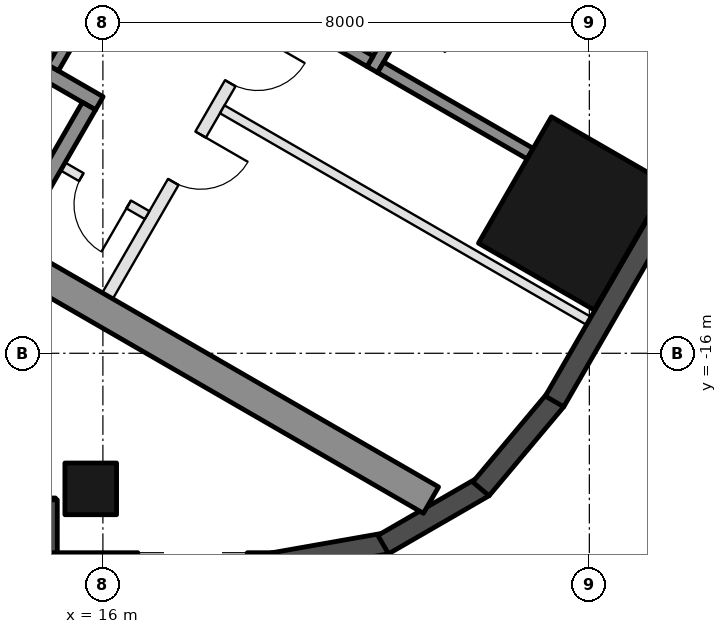
"""IFC4 building model, lengths in metres.
Left out: names, types, materials, properties, quantities, classifications, styles, units other than length and angle.
Written with IfcOpenShell. Run it as: python <this file> out.ifc"""

import sys

from ifc_helpers import new_model, si_unit, direction, frame, frame_2d, origin, origin_2d, place, context, subcontext, project, spatial, rectangle, hollow_rectangle, extrude, element, fill, save


model = new_model("IFC4")
c1 = context("Model", 3, precision=1e-05, world=origin(), true_north=direction((0.0, 1.0)))
c2 = subcontext(c1, "Body", "Model", "MODEL_VIEW")
j1 = project(units=[si_unit("LENGTHUNIT", "METRE"), si_unit("PLANEANGLEUNIT", "RADIAN")], contexts=[c1])
p1 = place(None, origin())
s1 = spatial("IfcSite", under=j1, at=p1, CompositionType="ELEMENT")
p2 = place(p1, origin())
s2 = spatial("IfcBuilding", under=s1, at=p2, CompositionType="ELEMENT")
p3 = place(p2, frame((0.0, 0.0, 165.1)))
s3 = spatial("IfcBuildingStorey", under=s2, at=p3, CompositionType="ELEMENT", Elevation=165.1)
p4 = place(p3, frame((15.8, -18.23, 0.0), z_axis=(0.0, 0.0, 1.0), x_axis=(-1.0, 0.0, 0.0)))
e1 = element("IfcColumn", 1, at=p4, inside=s3, PredefinedType="COLUMN", context=c2, shape_type="SweptSolid", body=[
    extrude(hollow_rectangle(XDim=0.85, YDim=0.85, WallThickness=0.04, at=origin_2d()), origin(), (0.0, 0.0, 1.0), 3.7),
])
p5 = place(p3, frame((23.729, -13.7, 0.0), z_axis=(0.0, 0.0, 1.0), x_axis=(0.5, 0.866025403784, 0.0)))
e2 = element("IfcColumn", 2, at=p5, inside=s3, PredefinedType="COLUMN", context=c2, shape_type="SweptSolid", body=[
    extrude(hollow_rectangle(XDim=2.4, YDim=2.2, WallThickness=0.06, at=origin_2d()), origin(), (0.0, 0.0, 1.0), 3.7),
])
p6 = place(p3, frame((8.48, -18.555, 0.0), z_axis=(0.0, 0.0, 1.0), x_axis=(1.0, 0.0, 0.0)))
e3 = element("IfcWall", 3, at=p6, inside=s3, PredefinedType="SOLIDWALL", context=c2, shape_type="SweptSolid", body=[
    extrude(rectangle(XDim=6.74, YDim=0.35, at=frame_2d((3.37, 0.0))), origin(), (0.0, 0.0, 1.0), 3.55),
])
p7 = place(p6, frame((0.32, 0.0, 0.0)))
e4 = element("IfcOpeningElement", 4, at=p7, cuts=e3, PredefinedType="OPENING", context=c2, shape_type="SweptSolid", body=[
    extrude(rectangle(XDim=2.4, YDim=2.4, at=frame_2d((1.2, 1.2))), frame((0.0, 0.185, 0.0), z_axis=(0.0, -1.0, 0.0), x_axis=(1.0, 0.0, 0.0)), (0.0, 0.0, 1.0), 0.37),
])
p8 = place(p6, frame((3.02, 0.0, 0.3)))
e5 = element("IfcOpeningElement", 5, at=p8, cuts=e3, PredefinedType="OPENING", context=c2, shape_type="SweptSolid", body=[
    extrude(rectangle(XDim=2.9, YDim=2.65, at=frame_2d((1.45, 1.325))), frame((0.0, 0.185, 0.0), z_axis=(0.0, -1.0, 0.0), x_axis=(1.0, 0.0, 0.0)), (0.0, 0.0, 1.0), 0.37),
])
p9 = place(p3, frame((15.075, -18.41, 0.0), z_axis=(0.0, 0.0, 1.0), x_axis=(0.0, -1.0, 0.0)))
e6 = element("IfcWall", 6, at=p9, inside=s3, PredefinedType="SOLIDWALL", context=c2, shape_type="SweptSolid", body=[
    extrude(rectangle(XDim=1.22, YDim=0.35, at=frame_2d((0.61, 0.0))), origin(), (0.0, 0.0, 1.0), 3.55),
])
p10 = place(p3, frame((14.9, -19.455, 0.0), z_axis=(0.0, 0.0, 1.0), x_axis=(1.0, 0.0, 0.0)))
e7 = element("IfcWall", 7, at=p10, inside=s3, PredefinedType="SOLIDWALL", context=c2, shape_type="SweptSolid", body=[
    extrude(rectangle(XDim=3.916, YDim=0.35, at=frame_2d((1.958, 0.0))), origin(), (0.0, 0.0, 1.0), 3.55),
])
p11 = place(p10, frame((1.675, 0.0, 0.3)))
e8 = element("IfcOpeningElement", 8, at=p11, cuts=e7, PredefinedType="OPENING", context=c2, shape_type="SweptSolid", body=[
    extrude(rectangle(XDim=1.8, YDim=2.65, at=frame_2d((0.9, 1.325))), frame((0.0, 0.185, 0.0), z_axis=(0.0, -1.0, 0.0), x_axis=(1.0, 0.0, 0.0)), (0.0, 0.0, 1.0), 0.37),
])
p12 = place(p3, frame((18.785, -19.458, 0.0), z_axis=(0.0, 0.0, 1.0), x_axis=(0.984798995425, 0.173697837091, 0.0)))
e9 = element("IfcWall", 9, at=p12, inside=s3, PredefinedType="SOLIDWALL", context=c2, shape_type="SweptSolid", body=[
    extrude(rectangle(XDim=1.91, YDim=0.35, at=frame_2d((0.955, 0.0))), origin(), (0.0, 0.0, 1.0), 3.55),
])
for number, where, z_axis, x_axis in (
    (10, (20.61, -19.147, 0.0), (0.0, 0.0, 1.0), (0.866, 0.5, 0.0)),
    (11, (22.217, -18.231, 0.0), (0.0, 0.0, 1.0), (0.643, 0.766, 0.0)),
):
    element("IfcWall", number, at=place(p3, frame(where, z_axis=z_axis, x_axis=x_axis)), inside=s3, PredefinedType="SOLIDWALL", context=c2, shape_type="SweptSolid", body=[
        extrude(rectangle(XDim=1.91, YDim=0.35, at=frame_2d((0.955, 0.0))), origin(), (0.0, 0.0, 1.0), 3.55),
    ])
p13 = place(p3, frame((23.427, -16.792, 0.0), z_axis=(0.0, 0.0, 1.0), x_axis=(0.500018773155, 0.866014564827, 0.0)))
e12 = element("IfcWall", 12, at=p13, inside=s3, PredefinedType="SOLIDWALL", context=c2, shape_type="SweptSolid", body=[
    extrude(rectangle(XDim=5.658, YDim=0.35, at=frame_2d((2.829, 0.0))), origin(), (0.0, 0.0, 1.0), 3.55),
])
p14 = place(p3, frame((8.547, -10.997, 0.0), z_axis=(0.0, 0.0, 1.0), x_axis=(0.866025009528, -0.500000682871, 0.0)))
e13 = element("IfcWall", 13, at=p14, inside=s3, PredefinedType="SHEAR", context=c2, shape_type="SweptSolid", body=[
    extrude(rectangle(XDim=14.837, YDim=0.5, at=frame_2d((7.418, 0.0))), origin(), (0.0, 0.0, 1.0), 3.5),
])
p15 = place(p3, frame((10.356, -8.664, 0.0), z_axis=(0.0, 0.0, 1.0), x_axis=(0.866028629588, -0.499994412703, 0.0)))
e14 = element("IfcWall", 14, at=p15, inside=s3, PredefinedType="SHEAR", context=c2, shape_type="SweptSolid", body=[
    extrude(rectangle(XDim=6.45, YDim=0.25, at=frame_2d((3.225, 0.0))), origin(), (0.0, 0.0, 1.0), 3.5),
])
p16 = place(p15, frame((0.3, 0.0, 0.0)))
e15 = element("IfcOpeningElement", 15, at=p16, cuts=e14, PredefinedType="OPENING", context=c2, shape_type="SweptSolid", body=[
    extrude(rectangle(XDim=1.0, YDim=2.1, at=frame_2d((0.5, 1.05))), frame((0.0, 0.135, 0.0), z_axis=(0.0, -1.0, 0.0), x_axis=(1.0, 0.0, 0.0)), (0.0, 0.0, 1.0), 0.27),
])
p17 = place(p3, frame((14.496, -14.143, 0.0), z_axis=(0.0, 0.0, 1.0), x_axis=(0.500062241894, 0.865989465428, 0.0)))
e16 = element("IfcWall", 16, at=p17, inside=s3, PredefinedType="SHEAR", context=c2, shape_type="SweptSolid", body=[
    extrude(rectangle(XDim=2.55, YDim=0.25, at=frame_2d((1.275, 0.0))), origin(), (0.0, 0.0, 1.0), 3.5),
])
p18 = place(p3, frame((15.181, -11.305, 0.0), z_axis=(0.0, 0.0, 1.0), x_axis=(0.49994636267, 0.866056369097, 0.0)))
e17 = element("IfcWall", 17, at=p18, inside=s3, PredefinedType="SHEAR", context=c2, shape_type="SweptSolid", body=[
    extrude(rectangle(XDim=2.8, YDim=0.2, at=frame_2d((1.4, 0.0))), origin(), (0.0, 0.0, 1.0), 3.5),
])
p19 = place(p3, frame((20.43, -11.333, 0.0), z_axis=(0.0, 0.0, 1.0), x_axis=(0.500001309137, 0.866024647952, 0.0)))
e18 = element("IfcWall", 18, at=p19, inside=s3, PredefinedType="SHEAR", context=c2, shape_type="SweptSolid", body=[
    extrude(rectangle(XDim=2.4, YDim=0.2, at=frame_2d((1.2, 0.0))), origin(), (0.0, 0.0, 1.0), 3.5),
])
p20 = place(p19, frame((0.85, 0.0, 0.0)))
e19 = element("IfcOpeningElement", 19, at=p20, cuts=e18, PredefinedType="OPENING", context=c2, shape_type="SweptSolid", body=[
    extrude(rectangle(XDim=0.9, YDim=2.1, at=frame_2d((0.45, 1.05))), frame((0.0, 0.11, 0.0), z_axis=(0.0, -1.0, 0.0), x_axis=(1.0, 0.0, 0.0)), (0.0, 0.0, 1.0), 0.22),
])
p21 = place(p3, frame((18.913, -10.342, 0.0), z_axis=(0.0, 0.0, 1.0), x_axis=(0.866038183914, -0.499977863513, 0.0)))
e20 = element("IfcWall", 20, at=p21, inside=s3, PredefinedType="SHEAR", context=c2, shape_type="SweptSolid", body=[
    extrude(rectangle(XDim=1.71, YDim=0.2, at=frame_2d((0.855, 0.0))), origin(), (0.0, 0.0, 1.0), 3.5),
])
p22 = place(p3, frame((20.567, -11.297, 0.0), z_axis=(0.0, 0.0, 1.0), x_axis=(0.866055327414, -0.49994816717, 0.0)))
e21 = element("IfcWall", 21, at=p22, inside=s3, PredefinedType="SHEAR", context=c2, shape_type="SweptSolid", body=[
    extrude(rectangle(XDim=2.84, YDim=0.2, at=frame_2d((1.42, 0.0))), origin(), (0.0, 0.0, 1.0), 3.5),
])
p23 = place(p3, frame((16.076, -15.055, 0.0), z_axis=(0.0, 0.0, 1.0), x_axis=(0.499995103361, 0.866028230842, 0.0)))
e22 = element("IfcWall", 22, at=p23, inside=s3, PredefinedType="PARTITIONING", context=c2, shape_type="SweptSolid", body=[
    extrude(rectangle(XDim=5.4, YDim=0.2, at=frame_2d((2.7, 0.0))), origin(), (0.0, 0.0, 1.0), 3.5),
])
p24 = place(p23, frame((2.163, 0.0, 0.0)))
e23 = element("IfcOpeningElement", 23, at=p24, cuts=e22, PredefinedType="OPENING", context=c2, shape_type="SweptSolid", body=[
    extrude(rectangle(XDim=0.9, YDim=2.1, at=frame_2d((0.45, 1.05))), frame((0.0, 0.11, 0.0), z_axis=(0.0, -1.0, 0.0), x_axis=(1.0, 0.0, 0.0)), (0.0, 0.0, 1.0), 0.22),
])
p25 = place(p23, frame((4.038, 0.0, 0.0)))
e24 = element("IfcOpeningElement", 24, at=p25, cuts=e22, PredefinedType="OPENING", context=c2, shape_type="SweptSolid", body=[
    extrude(rectangle(XDim=0.9, YDim=2.1, at=frame_2d((0.45, 1.05))), frame((0.0, 0.11, 0.0), z_axis=(0.0, -1.0, 0.0), x_axis=(1.0, 0.0, 0.0)), (0.0, 0.0, 1.0), 0.22),
])
p26 = place(p3, frame((15.342, -12.928, 0.0), z_axis=(0.0, 0.0, 1.0), x_axis=(0.865989903783, -0.500061482766, 0.0)))
e25 = element("IfcWall", 25, at=p26, inside=s3, PredefinedType="PARTITIONING", context=c2, shape_type="SweptSolid", body=[
    extrude(rectangle(XDim=1.6, YDim=0.15, at=frame_2d((0.8, 0.0))), origin(), (0.0, 0.0, 1.0), 3.5),
])
p27 = place(p26, frame((0.35, 0.0, 0.0)))
e26 = element("IfcOpeningElement", 26, at=p27, cuts=e25, PredefinedType="OPENING", context=c2, shape_type="SweptSolid", body=[
    extrude(rectangle(XDim=0.9, YDim=2.1, at=frame_2d((0.45, 1.05))), frame((0.0, 0.085, 0.0), z_axis=(0.0, -1.0, 0.0), x_axis=(1.0, 0.0, 0.0)), (0.0, 0.0, 1.0), 0.17),
])
p28 = place(p3, frame((17.963, -11.987, 0.0), z_axis=(0.0, 0.0, 1.0), x_axis=(0.866016523273, -0.500015381182, 0.0)))
e27 = element("IfcWall", 27, at=p28, inside=s3, PredefinedType="PARTITIONING", context=c2, shape_type="SweptSolid", body=[
    extrude(rectangle(XDim=6.95, YDim=0.15, at=frame_2d((3.475, 0.0))), origin(), (0.0, 0.0, 1.0), 3.5),
])
p29 = place(p27, frame((0.9, 0.0, 0.0), z_axis=(0.0, 0.0, 1.0), x_axis=(-1.0, 0.0, 0.0)))
e28 = element("IfcDoor", 28, at=p29, inside=s3, OperationType="SINGLE_SWING_LEFT", PredefinedType="DOOR", context=c2, shape_type="SweptSolid", body=[
    extrude(rectangle(XDim=0.9, YDim=2.1, at=frame_2d((0.45, 1.05))), frame((0.0, 0.025, 0.0), z_axis=(0.0, -1.0, 0.0), x_axis=(1.0, 0.0, 0.0)), (0.0, 0.0, 1.0), 0.05),
])
fill(e26, e28)
p30 = place(p24, frame((0.9, 0.0, 0.0), z_axis=(0.0, 0.0, 1.0), x_axis=(-1.0, 0.0, 0.0)))
e29 = element("IfcDoor", 29, at=p30, inside=s3, OperationType="SINGLE_SWING_LEFT", PredefinedType="DOOR", context=c2, shape_type="SweptSolid", body=[
    extrude(rectangle(XDim=0.9, YDim=2.1, at=frame_2d((0.45, 1.05))), frame((0.0, 0.025, 0.0), z_axis=(0.0, -1.0, 0.0), x_axis=(1.0, 0.0, 0.0)), (0.0, 0.0, 1.0), 0.05),
])
fill(e23, e29)
p31 = place(p25, frame((0.9, 0.0, 0.0), z_axis=(0.0, 0.0, 1.0), x_axis=(-1.0, 0.0, 0.0)))
e30 = element("IfcDoor", 30, at=p31, inside=s3, OperationType="SINGLE_SWING_LEFT", PredefinedType="DOOR", context=c2, shape_type="SweptSolid", body=[
    extrude(rectangle(XDim=0.9, YDim=2.1, at=frame_2d((0.45, 1.05))), frame((0.0, 0.025, 0.0), z_axis=(0.0, -1.0, 0.0), x_axis=(1.0, 0.0, 0.0)), (0.0, 0.0, 1.0), 0.05),
])
fill(e24, e30)
save(model, sys.argv[1])
